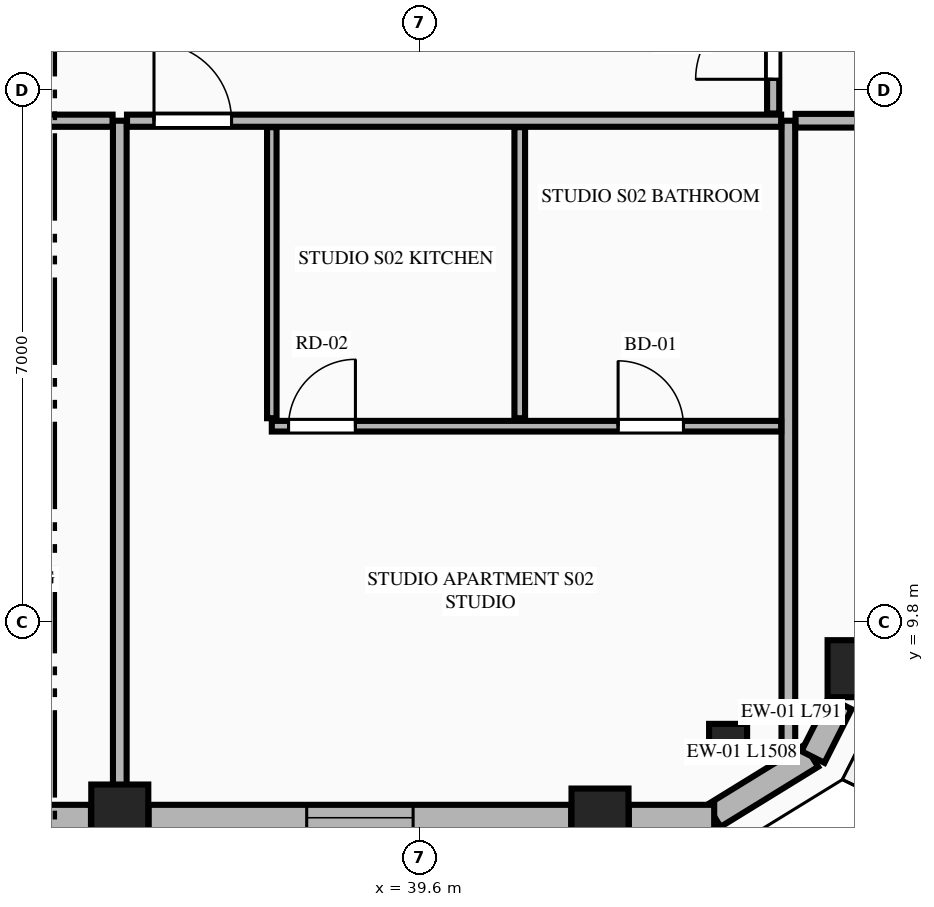
"""IFC4 building model, lengths in metres.
Left out: names, types, materials, properties, quantities, classifications, styles, units other than length and angle.
Written with IfcOpenShell. Run it as: python <this file> out.ifc"""

import sys

from ifc_helpers import new_model, si_unit, direction, frame, frame_2d, origin, origin_2d, place, context, subcontext, project, spatial, rectangle, extrude, element, fill, save


model = new_model("IFC4")
c1 = context("Model", 3, precision=1e-05, world=origin(), true_north=direction((0.0, 1.0)))
c2 = subcontext(c1, "Body", "Model", "MODEL_VIEW")
j1 = project(units=[si_unit("LENGTHUNIT", "METRE"), si_unit("PLANEANGLEUNIT", "RADIAN")], contexts=[c1])
p1 = place(None, origin())
s1 = spatial("IfcSite", under=j1, at=p1, CompositionType="ELEMENT")
p2 = place(p1, origin())
s2 = spatial("IfcBuilding", under=s1, at=p2, CompositionType="ELEMENT")
p3 = place(p2, frame((0.0, 0.0, 256.2)))
s3 = spatial("IfcBuildingStorey", under=s2, at=p3, CompositionType="ELEMENT", Elevation=256.2)
for number, where, z_axis, x_axis in (
    (1, (35.654, 7.292, 0.0), (0.0, 0.0, 1.0), (1.0, 0.0, 0.0)),
    (2, (41.972, 7.239, 0.0), (0.0, 0.0, 1.0), (1.0, 0.0, 0.0)),
    (3, (45.341, 9.191, 0.0), (0.0, 0.0, 1.0), (1.0, 0.0, 0.0)),
):
    element("IfcColumn", number, at=place(p3, frame(where, z_axis=z_axis, x_axis=x_axis)), inside=s3, PredefinedType="COLUMN", context=c2, shape_type="SweptSolid", body=[
        extrude(rectangle(XDim=0.75, YDim=0.75, at=origin_2d()), origin(), (0.0, 0.0, 1.0), 3.65),
    ])
p4 = place(p3, frame((43.657, 8.215, 0.0), z_axis=(0.0, 0.0, 1.0), x_axis=(0.865256437757, 0.501329529272, 0.0)))
e4 = element("IfcColumn", 4, at=p4, inside=s3, PredefinedType="PILASTER", context=c2, shape_type="SweptSolid", body=[
    extrude(rectangle(XDim=0.5, YDim=0.35, at=origin_2d()), origin(), (0.0, 0.0, 1.0), 3.65),
])
p5 = place(p3, frame((43.469, 7.255, 0.0), z_axis=(0.0, 0.0, 1.0), x_axis=(0.851680557619, 0.52406128246, 0.0)))
e5 = element("IfcWall", 5, at=p5, inside=s3, PredefinedType="STANDARD", context=c2, shape_type="SweptSolid", body=[
    extrude(rectangle(XDim=1.508, YDim=0.34, at=frame_2d((0.754, 0.0))), origin(), (0.0, 0.0, 1.0), 3.45),
])
p6 = place(p3, frame((29.525, 7.23, 0.0), z_axis=(0.0, 0.0, 1.0), x_axis=(1.0, 0.0, 0.0)))
e6 = element("IfcWall", 6, at=p6, inside=s3, PredefinedType="STANDARD", context=c2, shape_type="SweptSolid", body=[
    extrude(rectangle(XDim=5.75, YDim=0.34, at=frame_2d((2.875, 0.0))), origin(), (0.0, 0.0, 1.0), 2.983),
])
p7 = place(p6, frame((2.1, 0.0, 0.75)))
e7 = element("IfcOpeningElement", 7, at=p7, cuts=e6, PredefinedType="OPENING", context=c2, shape_type="SweptSolid", body=[
    extrude(rectangle(XDim=1.55, YDim=2.05, at=frame_2d((0.775, 1.025))), frame((0.0, 0.18, 0.0), z_axis=(0.0, -1.0, 0.0), x_axis=(1.0, 0.0, 0.0)), (0.0, 0.0, 1.0), 0.36),
])
p8 = place(p3, frame((36.033, 7.23, 0.0), z_axis=(0.0, 0.0, 1.0), x_axis=(1.0, 0.0, 0.0)))
e8 = element("IfcWall", 8, at=p8, inside=s3, PredefinedType="STANDARD", context=c2, shape_type="SweptSolid", body=[
    extrude(rectangle(XDim=5.56, YDim=0.34, at=frame_2d((2.78, 0.0))), origin(), (0.0, 0.0, 1.0), 2.983),
])
p9 = place(p8, frame((2.08, 0.0, 0.75)))
e9 = element("IfcOpeningElement", 9, at=p9, cuts=e8, PredefinedType="OPENING", context=c2, shape_type="SweptSolid", body=[
    extrude(rectangle(XDim=1.4, YDim=2.05, at=frame_2d((0.7, 1.025))), frame((0.0, 0.18, 0.0), z_axis=(0.0, -1.0, 0.0), x_axis=(1.0, 0.0, 0.0)), (0.0, 0.0, 1.0), 0.36),
])
p10 = place(p3, frame((42.351, 7.23, 0.0), z_axis=(0.0, 0.0, 1.0), x_axis=(1.0, 0.0, 0.0)))
e10 = element("IfcWall", 10, at=p10, inside=s3, PredefinedType="STANDARD", context=c2, shape_type="SweptSolid", body=[
    extrude(rectangle(XDim=1.123, YDim=0.34, at=frame_2d((0.562, 0.0))), origin(), (0.0, 0.0, 1.0), 3.45),
])
p11 = place(p3, frame((44.773, 8.029, 0.0), z_axis=(0.0, 0.0, 1.0), x_axis=(0.451159191899, 0.892443490404, 0.0)))
e11 = element("IfcWall", 11, at=p11, inside=s3, PredefinedType="STANDARD", context=c2, shape_type="SweptSolid", body=[
    extrude(rectangle(XDim=0.791, YDim=0.34, at=frame_2d((0.396, 0.0))), origin(), (0.0, 0.0, 1.0), 3.45),
])
p12 = place(p3, frame((35.654, 7.405, 0.0), z_axis=(0.0, 0.0, 1.0), x_axis=(0.0, 1.0, 0.0)))
e12 = element("IfcWall", 12, at=p12, inside=s3, PredefinedType="PARTITIONING", context=c2, shape_type="SweptSolid", body=[
    extrude(rectangle(XDim=8.995, YDim=0.18, at=frame_2d((4.498, 0.0))), origin(), (0.0, 0.0, 1.0), 2.907),
])
p13 = place(p3, frame((44.45, 8.119, 0.0), z_axis=(0.0, 0.0, 1.0), x_axis=(0.0, 1.0, 0.0)))
e13 = element("IfcWall", 13, at=p13, inside=s3, PredefinedType="PARTITIONING", context=c2, shape_type="SweptSolid", body=[
    extrude(rectangle(XDim=8.281, YDim=0.18, at=frame_2d((4.141, 0.0))), origin(), (0.0, 0.0, 1.0), 3.45),
])
p14 = place(p3, frame((20.445, 16.4, 0.0), z_axis=(0.0, 0.0, 1.0), x_axis=(1.0, 0.0, 0.0)))
e14 = element("IfcWall", 14, at=p14, inside=s3, PredefinedType="PARTITIONING", context=c2, shape_type="SweptSolid", body=[
    extrude(rectangle(XDim=15.114, YDim=0.16, at=frame_2d((7.557, 0.0))), origin(), (0.0, 0.0, 1.0), 3.45),
])
p15 = place(p14, frame((13.259, 0.0, 0.0)))
e15 = element("IfcOpeningElement", 15, at=p15, cuts=e14, PredefinedType="OPENING", context=c2, shape_type="SweptSolid", body=[
    extrude(rectangle(XDim=1.02, YDim=2.25, at=frame_2d((0.51, 1.125))), frame((0.0, 0.09, 0.0), z_axis=(0.0, -1.0, 0.0), x_axis=(1.0, 0.0, 0.0)), (0.0, 0.0, 1.0), 0.18),
])
p16 = place(p3, frame((35.749, 16.4, 0.0), z_axis=(0.0, 0.0, 1.0), x_axis=(1.0, 0.0, 0.0)))
e16 = element("IfcWall", 16, at=p16, inside=s3, PredefinedType="PARTITIONING", context=c2, shape_type="SweptSolid", body=[
    extrude(rectangle(XDim=8.606, YDim=0.16, at=frame_2d((4.303, 0.0))), origin(), (0.0, 0.0, 1.0), 3.45),
])
p17 = place(p16, frame((0.355, 0.0, 0.0)))
e17 = element("IfcOpeningElement", 17, at=p17, cuts=e16, PredefinedType="OPENING", context=c2, shape_type="SweptSolid", body=[
    extrude(rectangle(XDim=1.02, YDim=2.25, at=frame_2d((0.51, 1.125))), frame((0.0, 0.09, 0.0), z_axis=(0.0, -1.0, 0.0), x_axis=(1.0, 0.0, 0.0)), (0.0, 0.0, 1.0), 0.18),
])
p18 = place(p3, frame((37.654, 12.486, 0.0), z_axis=(0.0, 0.0, 1.0), x_axis=(0.0, 1.0, 0.0)))
e18 = element("IfcWall", 18, at=p18, inside=s3, PredefinedType="PARTITIONING", context=c2, shape_type="SweptSolid", body=[
    extrude(rectangle(XDim=3.829, YDim=0.125, at=frame_2d((1.915, 0.0))), origin(), (0.0, 0.0, 1.0), 3.45),
])
p19 = place(p3, frame((37.654, 12.381, 0.0), z_axis=(0.0, 0.0, 1.0), x_axis=(1.0, 0.0, 0.0)))
e19 = element("IfcWall", 19, at=p19, inside=s3, PredefinedType="PLUMBINGWALL", context=c2, shape_type="SweptSolid", body=[
    extrude(rectangle(XDim=6.701, YDim=0.14, at=frame_2d((3.351, 0.0))), origin(), (0.0, 0.0, 1.0), 3.45),
])
p20 = place(p19, frame((4.556, 0.0, 0.0)))
e20 = element("IfcOpeningElement", 20, at=p20, cuts=e19, PredefinedType="OPENING", context=c2, shape_type="SweptSolid", body=[
    extrude(rectangle(XDim=0.86, YDim=2.1, at=frame_2d((0.43, 1.05))), frame((0.0, 0.08, 0.0), z_axis=(0.0, -1.0, 0.0), x_axis=(1.0, 0.0, 0.0)), (0.0, 0.0, 1.0), 0.16),
])
p21 = place(p19, frame((0.22, 0.0, 0.0)))
e21 = element("IfcOpeningElement", 21, at=p21, cuts=e19, PredefinedType="OPENING", context=c2, shape_type="SweptSolid", body=[
    extrude(rectangle(XDim=0.88, YDim=2.15, at=frame_2d((0.44, 1.075))), frame((0.0, 0.08, 0.0), z_axis=(0.0, -1.0, 0.0), x_axis=(1.0, 0.0, 0.0)), (0.0, 0.0, 1.0), 0.16),
])
p22 = place(p3, frame((40.916, 12.486, 0.0), z_axis=(0.0, 0.0, 1.0), x_axis=(0.0, 1.0, 0.0)))
e22 = element("IfcWall", 22, at=p22, inside=s3, PredefinedType="PLUMBINGWALL", context=c2, shape_type="SweptSolid", body=[
    extrude(rectangle(XDim=3.829, YDim=0.14, at=frame_2d((1.915, 0.0))), origin(), (0.0, 0.0, 1.0), 3.45),
])
p23 = place(p3, frame((44.545, 16.4, 0.0), z_axis=(0.0, 0.0, 1.0), x_axis=(1.0, 0.0, 0.0)))
e23 = element("IfcWall", 23, at=p23, inside=s3, PredefinedType="PARTITIONING", context=c2, shape_type="SweptSolid", body=[
    extrude(rectangle(XDim=4.221, YDim=0.18, at=frame_2d((2.111, 0.0))), origin(), (0.0, 0.0, 1.0), 3.45),
])
p24 = place(p3, frame((44.25, 16.495, 0.0), z_axis=(0.0, 0.0, 1.0), x_axis=(0.0, 1.0, 0.0)))
e24 = element("IfcWall", 24, at=p24, inside=s3, PredefinedType="PARTITIONING", context=c2, shape_type="SweptSolid", body=[
    extrude(rectangle(XDim=9.854, YDim=0.16, at=frame_2d((4.927, 0.0))), origin(), (0.0, 0.0, 1.0), 3.137),
])
p25 = place(p24, frame((0.45, 0.0, 0.0)))
e25 = element("IfcOpeningElement", 25, at=p25, cuts=e24, PredefinedType="OPENING", context=c2, shape_type="SweptSolid", body=[
    extrude(rectangle(XDim=1.02, YDim=2.25, at=frame_2d((0.51, 1.125))), frame((0.0, 0.09, 0.0), z_axis=(0.0, -1.0, 0.0), x_axis=(1.0, 0.0, 0.0)), (0.0, 0.0, 1.0), 0.18),
])
p26 = place(p9, origin())
e26 = element("IfcWindow", 26, at=p26, inside=s3, PartitioningType="SINGLE_PANEL", PredefinedType="WINDOW", context=c2, shape_type="SweptSolid", body=[
    extrude(rectangle(XDim=1.4, YDim=2.05, at=frame_2d((0.7, 1.025))), frame((0.0, 0.03, 0.0), z_axis=(0.0, -1.0, 0.0), x_axis=(1.0, 0.0, 0.0)), (0.0, 0.0, 1.0), 0.06),
])
fill(e9, e26)
p27 = place(p20, origin())
e27 = element("IfcDoor", 27, at=p27, inside=s3, OperationType="SINGLE_SWING_LEFT", PredefinedType="DOOR", context=c2, shape_type="SweptSolid", body=[
    extrude(rectangle(XDim=0.86, YDim=2.1, at=frame_2d((0.43, 1.05))), frame((0.0, 0.025, 0.0), z_axis=(0.0, -1.0, 0.0), x_axis=(1.0, 0.0, 0.0)), (0.0, 0.0, 1.0), 0.05),
])
fill(e20, e27)
p28 = place(p17, origin())
e28 = element("IfcDoor", 28, at=p28, inside=s3, OperationType="SINGLE_SWING_LEFT", PredefinedType="DOOR", context=c2, shape_type="SweptSolid", body=[
    extrude(rectangle(XDim=1.02, YDim=2.25, at=frame_2d((0.51, 1.125))), frame((0.0, 0.025, 0.0), z_axis=(0.0, -1.0, 0.0), x_axis=(1.0, 0.0, 0.0)), (0.0, 0.0, 1.0), 0.05),
])
fill(e17, e28)
p29 = place(p21, origin())
e29 = element("IfcDoor", 29, at=p29, inside=s3, OperationType="SINGLE_SWING_RIGHT", PredefinedType="DOOR", context=c2, shape_type="SweptSolid", body=[
    extrude(rectangle(XDim=0.88, YDim=2.15, at=frame_2d((0.44, 1.075))), frame((0.0, 0.025, 0.0), z_axis=(0.0, -1.0, 0.0), x_axis=(1.0, 0.0, 0.0)), (0.0, 0.0, 1.0), 0.05),
])
fill(e21, e29)
p30 = place(p25, origin())
e30 = element("IfcDoor", 30, at=p30, inside=s3, OperationType="SINGLE_SWING_LEFT", PredefinedType="DOOR", context=c2, shape_type="SweptSolid", body=[
    extrude(rectangle(XDim=1.02, YDim=2.25, at=frame_2d((0.51, 1.125))), frame((0.0, 0.025, 0.0), z_axis=(0.0, -1.0, 0.0), x_axis=(1.0, 0.0, 0.0)), (0.0, 0.0, 1.0), 0.05),
])
fill(e25, e30)
save(model, sys.argv[1])
